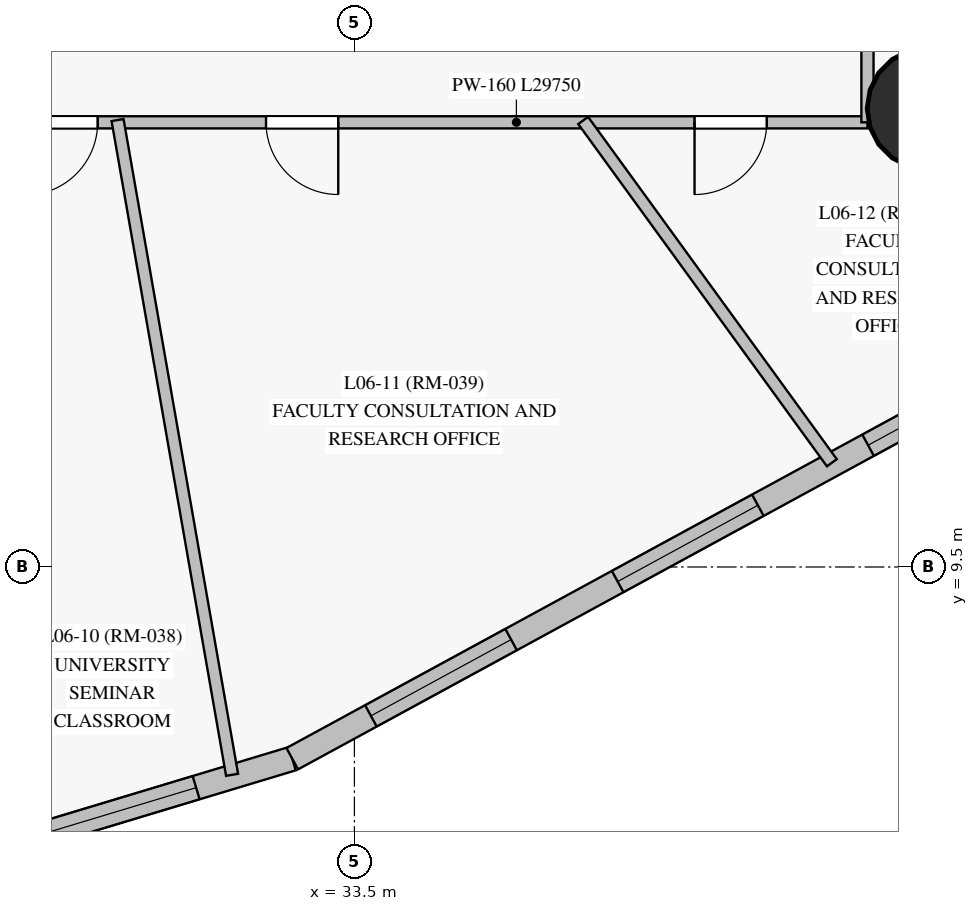
"""IFC4 building model, lengths in metres.
Left out: names, types, materials, properties, quantities, classifications, styles, units other than length and angle.
Written with IfcOpenShell. Run it as: python <this file> out.ifc"""

import sys

from ifc_helpers import new_model, si_unit, direction, frame, frame_2d, origin, origin_with_axes, origin_2d, place, context, subcontext, project, spatial, rectangle, circle, extrude, source, transform, mapped, element, fill, save


model = new_model("IFC4")
c1 = context("Model", 3, precision=1e-05, world=origin(), true_north=direction((0.0, 1.0)))
c2 = subcontext(c1, "Body", "Model", "MODEL_VIEW")
j1 = project(units=[si_unit("LENGTHUNIT", "METRE"), si_unit("PLANEANGLEUNIT", "RADIAN")], contexts=[c1])
p1 = place(None, origin())
s1 = spatial("IfcSite", under=j1, at=p1, CompositionType="ELEMENT")
p2 = place(p1, origin())
s2 = spatial("IfcBuilding", under=s1, at=p2, CompositionType="ELEMENT")
p3 = place(p2, frame((0.0, 0.0, 26.5)))
s3 = spatial("IfcBuildingStorey", under=s2, at=p3, CompositionType="ELEMENT", Elevation=26.5)
m1 = source(origin_with_axes(), c2, "Body", "SweptSolid", [
    extrude(circle(Radius=0.8, at=origin_2d()), origin(), (0.0, 0.0, 1.0), 3.6),
])
p4 = place(p3, frame((41.046, 15.53, 0.0), z_axis=(0.0, 0.0, 1.0), x_axis=(1.0, 0.0, 0.0)))
e1 = element("IfcColumn", 1, at=p4, inside=s3, PredefinedType="COLUMN", context=c2, shape_type="MappedRepresentation", body=[
    mapped(m1, transform((0.0, 0.0, 0.0), scale=1.0)),
])
p5 = place(p3, frame((17.099, 2.279, 0.0), z_axis=(0.0, 0.0, 1.0), x_axis=(0.957423656835, 0.288686579759, 0.0)))
e2 = element("IfcWall", 2, at=p5, inside=s3, PredefinedType="SOLIDWALL", context=c2, shape_type="SweptSolid", body=[
    extrude(rectangle(XDim=16.276, YDim=0.32, at=frame_2d((8.138, 0.0))), origin(), (0.0, 0.0, 1.0), 3.35),
])
p6 = place(p5, frame((1.017, 0.0, 0.85)))
e3 = element("IfcOpeningElement", 3, at=p6, cuts=e2, PredefinedType="OPENING", context=c2, shape_type="SweptSolid", body=[
    extrude(rectangle(XDim=2.1, YDim=1.95, at=frame_2d((1.05, 0.975))), frame((0.0, 0.17, 0.0), z_axis=(0.0, -1.0, 0.0), x_axis=(1.0, 0.0, 0.0)), (0.0, 0.0, 1.0), 0.34),
])
p7 = place(p5, frame((5.208, 0.0, 0.85)))
e4 = element("IfcOpeningElement", 4, at=p7, cuts=e2, PredefinedType="OPENING", context=c2, shape_type="SweptSolid", body=[
    extrude(rectangle(XDim=2.1, YDim=1.95, at=frame_2d((1.05, 0.975))), frame((0.0, 0.17, 0.0), z_axis=(0.0, -1.0, 0.0), x_axis=(1.0, 0.0, 0.0)), (0.0, 0.0, 1.0), 0.34),
])
p8 = place(p5, frame((9.345, 0.0, 0.85)))
e5 = element("IfcOpeningElement", 5, at=p8, cuts=e2, PredefinedType="OPENING", context=c2, shape_type="SweptSolid", body=[
    extrude(rectangle(XDim=2.1, YDim=1.95, at=frame_2d((1.05, 0.975))), frame((0.0, 0.17, 0.0), z_axis=(0.0, -1.0, 0.0), x_axis=(1.0, 0.0, 0.0)), (0.0, 0.0, 1.0), 0.34),
])
p9 = place(p5, frame((12.855, 0.0, 0.85)))
e6 = element("IfcOpeningElement", 6, at=p9, cuts=e2, PredefinedType="OPENING", context=c2, shape_type="SweptSolid", body=[
    extrude(rectangle(XDim=2.1, YDim=1.95, at=frame_2d((1.05, 0.975))), frame((0.0, 0.17, 0.0), z_axis=(0.0, -1.0, 0.0), x_axis=(1.0, 0.0, 0.0)), (0.0, 0.0, 1.0), 0.34),
])
p10 = place(p3, frame((32.683, 6.978, 0.0), z_axis=(0.0, 0.0, 1.0), x_axis=(0.878311519502, 0.478088772833, 0.0)))
e7 = element("IfcWall", 7, at=p10, inside=s3, PredefinedType="SOLIDWALL", context=c2, shape_type="SweptSolid", body=[
    extrude(rectangle(XDim=11.319, YDim=0.32, at=frame_2d((5.659, 0.0))), origin(), (0.0, 0.0, 1.0), 3.35),
])
p11 = place(p10, frame((1.178, 0.0, 0.85)))
e8 = element("IfcOpeningElement", 8, at=p11, cuts=e7, PredefinedType="OPENING", context=c2, shape_type="SweptSolid", body=[
    extrude(rectangle(XDim=2.1, YDim=1.95, at=frame_2d((1.05, 0.975))), frame((0.0, 0.17, 0.0), z_axis=(0.0, -1.0, 0.0), x_axis=(1.0, 0.0, 0.0)), (0.0, 0.0, 1.0), 0.34),
])
p12 = place(p10, frame((4.874, 0.0, 0.85)))
e9 = element("IfcOpeningElement", 9, at=p12, cuts=e7, PredefinedType="OPENING", context=c2, shape_type="SweptSolid", body=[
    extrude(rectangle(XDim=2.1, YDim=1.95, at=frame_2d((1.05, 0.975))), frame((0.0, 0.17, 0.0), z_axis=(0.0, -1.0, 0.0), x_axis=(1.0, 0.0, 0.0)), (0.0, 0.0, 1.0), 0.34),
])
p13 = place(p10, frame((8.625, 0.0, 0.85)))
e10 = element("IfcOpeningElement", 10, at=p13, cuts=e7, PredefinedType="OPENING", context=c2, shape_type="SweptSolid", body=[
    extrude(rectangle(XDim=2.1, YDim=1.95, at=frame_2d((1.05, 0.975))), frame((0.0, 0.17, 0.0), z_axis=(0.0, -1.0, 0.0), x_axis=(1.0, 0.0, 0.0)), (0.0, 0.0, 1.0), 0.34),
])
p14 = place(p3, frame((40.25, 15.35, 0.0), z_axis=(0.0, 0.0, 1.0), x_axis=(-1.0, 0.0, 0.0)))
e11 = element("IfcWall", 11, at=p14, inside=s3, PredefinedType="PARTITIONING", context=c2, shape_type="SweptSolid", body=[
    extrude(rectangle(XDim=29.75, YDim=0.16, at=frame_2d((14.875, 0.0))), origin(), (0.0, 0.0, 1.0), 2.7),
])
p15 = place(p14, frame((26.803, 0.0, 0.0)))
e12 = element("IfcOpeningElement", 12, at=p15, cuts=e11, PredefinedType="OPENING", context=c2, shape_type="SweptSolid", body=[
    extrude(rectangle(XDim=0.95, YDim=2.15, at=frame_2d((0.475, 1.075))), frame((0.0, 0.09, 0.0), z_axis=(0.0, -1.0, 0.0), x_axis=(1.0, 0.0, 0.0)), (0.0, 0.0, 1.0), 0.18),
])
p16 = place(p14, frame((23.181, 0.0, 0.0)))
e13 = element("IfcOpeningElement", 13, at=p16, cuts=e11, PredefinedType="OPENING", context=c2, shape_type="SweptSolid", body=[
    extrude(rectangle(XDim=0.95, YDim=2.15, at=frame_2d((0.475, 1.075))), frame((0.0, 0.09, 0.0), z_axis=(0.0, -1.0, 0.0), x_axis=(1.0, 0.0, 0.0)), (0.0, 0.0, 1.0), 0.18),
])
p17 = place(p14, frame((21.097, 0.0, 0.0)))
e14 = element("IfcOpeningElement", 14, at=p17, cuts=e11, PredefinedType="OPENING", context=c2, shape_type="SweptSolid", body=[
    extrude(rectangle(XDim=0.95, YDim=2.15, at=frame_2d((0.475, 1.075))), frame((0.0, 0.09, 0.0), z_axis=(0.0, -1.0, 0.0), x_axis=(1.0, 0.0, 0.0)), (0.0, 0.0, 1.0), 0.18),
])
p18 = place(p14, frame((18.772, 0.0, 0.0)))
e15 = element("IfcOpeningElement", 15, at=p18, cuts=e11, PredefinedType="OPENING", context=c2, shape_type="SweptSolid", body=[
    extrude(rectangle(XDim=0.95, YDim=2.15, at=frame_2d((0.475, 1.075))), frame((0.0, 0.09, 0.0), z_axis=(0.0, -1.0, 0.0), x_axis=(1.0, 0.0, 0.0)), (0.0, 0.0, 1.0), 0.18),
])
p19 = place(p14, frame((16.089, 0.0, 0.0)))
e16 = element("IfcOpeningElement", 16, at=p19, cuts=e11, PredefinedType="OPENING", context=c2, shape_type="SweptSolid", body=[
    extrude(rectangle(XDim=0.96, YDim=2.15, at=frame_2d((0.48, 1.075))), frame((0.0, 0.09, 0.0), z_axis=(0.0, -1.0, 0.0), x_axis=(1.0, 0.0, 0.0)), (0.0, 0.0, 1.0), 0.18),
])
p20 = place(p14, frame((14.21, 0.0, 0.0)))
e17 = element("IfcOpeningElement", 17, at=p20, cuts=e11, PredefinedType="OPENING", context=c2, shape_type="SweptSolid", body=[
    extrude(rectangle(XDim=0.95, YDim=2.15, at=frame_2d((0.475, 1.075))), frame((0.0, 0.09, 0.0), z_axis=(0.0, -1.0, 0.0), x_axis=(1.0, 0.0, 0.0)), (0.0, 0.0, 1.0), 0.18),
])
p21 = place(p14, frame((11.995, 0.0, 0.0)))
e18 = element("IfcOpeningElement", 18, at=p21, cuts=e11, PredefinedType="OPENING", context=c2, shape_type="SweptSolid", body=[
    extrude(rectangle(XDim=0.95, YDim=2.15, at=frame_2d((0.475, 1.075))), frame((0.0, 0.09, 0.0), z_axis=(0.0, -1.0, 0.0), x_axis=(1.0, 0.0, 0.0)), (0.0, 0.0, 1.0), 0.18),
])
p22 = place(p14, frame((10.127, 0.0, 0.0)))
e19 = element("IfcOpeningElement", 19, at=p22, cuts=e11, PredefinedType="OPENING", context=c2, shape_type="SweptSolid", body=[
    extrude(rectangle(XDim=0.96, YDim=2.15, at=frame_2d((0.48, 1.075))), frame((0.0, 0.09, 0.0), z_axis=(0.0, -1.0, 0.0), x_axis=(1.0, 0.0, 0.0)), (0.0, 0.0, 1.0), 0.18),
])
p23 = place(p14, frame((6.962, 0.0, 0.0)))
e20 = element("IfcOpeningElement", 20, at=p23, cuts=e11, PredefinedType="OPENING", context=c2, shape_type="SweptSolid", body=[
    extrude(rectangle(XDim=0.95, YDim=2.15, at=frame_2d((0.475, 1.075))), frame((0.0, 0.09, 0.0), z_axis=(0.0, -1.0, 0.0), x_axis=(1.0, 0.0, 0.0)), (0.0, 0.0, 1.0), 0.18),
])
p24 = place(p14, frame((1.325, 0.0, 0.0)))
e21 = element("IfcOpeningElement", 21, at=p24, cuts=e11, PredefinedType="OPENING", context=c2, shape_type="SweptSolid", body=[
    extrude(rectangle(XDim=0.95, YDim=2.15, at=frame_2d((0.475, 1.075))), frame((0.0, 0.09, 0.0), z_axis=(0.0, -1.0, 0.0), x_axis=(1.0, 0.0, 0.0)), (0.0, 0.0, 1.0), 0.18),
])
p25 = place(p3, frame((40.25, 37.65, 0.0), z_axis=(0.0, 0.0, 1.0), x_axis=(0.0, -1.0, 0.0)))
e22 = element("IfcWall", 22, at=p25, inside=s3, PredefinedType="PARTITIONING", context=c2, shape_type="SweptSolid", body=[
    extrude(rectangle(XDim=22.3, YDim=0.16, at=frame_2d((11.15, 0.0))), origin(), (0.0, 0.0, 1.0), 2.75),
])
p26 = place(p25, frame((16.25, 0.0, 0.0)))
e23 = element("IfcOpeningElement", 23, at=p26, cuts=e22, PredefinedType="OPENING", context=c2, shape_type="SweptSolid", body=[
    extrude(rectangle(XDim=0.96, YDim=2.15, at=frame_2d((0.48, 1.075))), frame((0.0, 0.09, 0.0), z_axis=(0.0, -1.0, 0.0), x_axis=(1.0, 0.0, 0.0)), (0.0, 0.0, 1.0), 0.18),
])
p27 = place(p25, frame((14.02, 0.0, 0.0)))
e24 = element("IfcOpeningElement", 24, at=p27, cuts=e22, PredefinedType="OPENING", context=c2, shape_type="SweptSolid", body=[
    extrude(rectangle(XDim=0.95, YDim=2.15, at=frame_2d((0.475, 1.075))), frame((0.0, 0.09, 0.0), z_axis=(0.0, -1.0, 0.0), x_axis=(1.0, 0.0, 0.0)), (0.0, 0.0, 1.0), 0.18),
])
p28 = place(p25, frame((12.052, 0.0, 0.0)))
e25 = element("IfcOpeningElement", 25, at=p28, cuts=e22, PredefinedType="OPENING", context=c2, shape_type="SweptSolid", body=[
    extrude(rectangle(XDim=0.95, YDim=2.15, at=frame_2d((0.475, 1.075))), frame((0.0, 0.09, 0.0), z_axis=(0.0, -1.0, 0.0), x_axis=(1.0, 0.0, 0.0)), (0.0, 0.0, 1.0), 0.18),
])
p29 = place(p25, frame((4.235, 0.0, 0.0)))
e26 = element("IfcOpeningElement", 26, at=p29, cuts=e22, PredefinedType="OPENING", context=c2, shape_type="SweptSolid", body=[
    extrude(rectangle(XDim=0.96, YDim=2.15, at=frame_2d((0.48, 1.075))), frame((0.0, 0.09, 0.0), z_axis=(0.0, -1.0, 0.0), x_axis=(1.0, 0.0, 0.0)), (0.0, 0.0, 1.0), 0.18),
])
p30 = place(p25, frame((10.45, 0.0, 0.0)))
e27 = element("IfcOpeningElement", 27, at=p30, cuts=e22, PredefinedType="OPENING", context=c2, shape_type="SweptSolid", body=[
    extrude(rectangle(XDim=0.86, YDim=2.1, at=frame_2d((0.43, 1.05))), frame((0.0, 0.09, 0.0), z_axis=(0.0, -1.0, 0.0), x_axis=(1.0, 0.0, 0.0)), (0.0, 0.0, 1.0), 0.18),
])
p31 = place(p25, frame((1.94, 0.0, 0.0)))
e28 = element("IfcOpeningElement", 28, at=p31, cuts=e22, PredefinedType="OPENING", context=c2, shape_type="SweptSolid", body=[
    extrude(rectangle(XDim=0.96, YDim=2.15, at=frame_2d((0.48, 1.075))), frame((0.0, 0.09, 0.0), z_axis=(0.0, -1.0, 0.0), x_axis=(1.0, 0.0, 0.0)), (0.0, 0.0, 1.0), 0.18),
])
p32 = place(p25, frame((17.39, 0.0, 0.0)))
e29 = element("IfcOpeningElement", 29, at=p32, cuts=e22, PredefinedType="OPENING", context=c2, shape_type="SweptSolid", body=[
    extrude(rectangle(XDim=0.95, YDim=2.15, at=frame_2d((0.475, 1.075))), frame((0.0, 0.09, 0.0), z_axis=(0.0, -1.0, 0.0), x_axis=(1.0, 0.0, 0.0)), (0.0, 0.0, 1.0), 0.18),
])
p33 = place(p25, frame((18.522, 0.0, 0.0)))
e30 = element("IfcOpeningElement", 30, at=p33, cuts=e22, PredefinedType="OPENING", context=c2, shape_type="SweptSolid", body=[
    extrude(rectangle(XDim=0.95, YDim=2.15, at=frame_2d((0.475, 1.075))), frame((0.0, 0.09, 0.0), z_axis=(0.0, -1.0, 0.0), x_axis=(1.0, 0.0, 0.0)), (0.0, 0.0, 1.0), 0.18),
])
p34 = place(p25, frame((8.331, 0.0, 0.0)))
e31 = element("IfcOpeningElement", 31, at=p34, cuts=e22, PredefinedType="OPENING", context=c2, shape_type="SweptSolid", body=[
    extrude(rectangle(XDim=0.86, YDim=2.04, at=frame_2d((0.43, 1.02))), frame((0.0, 0.09, 0.0), z_axis=(0.0, -1.0, 0.0), x_axis=(1.0, 0.0, 0.0)), (0.0, 0.0, 1.0), 0.18),
])
p35 = place(p25, frame((6.992, 0.0, 0.0)))
e32 = element("IfcOpeningElement", 32, at=p35, cuts=e22, PredefinedType="OPENING", context=c2, shape_type="SweptSolid", body=[
    extrude(rectangle(XDim=0.86, YDim=2.04, at=frame_2d((0.43, 1.02))), frame((0.0, 0.09, 0.0), z_axis=(0.0, -1.0, 0.0), x_axis=(1.0, 0.0, 0.0)), (0.0, 0.0, 1.0), 0.18),
])
p36 = place(p3, frame((30.384, 15.38, 0.0), z_axis=(0.0, 0.0, 1.0), x_axis=(0.172289580818, -0.985046344261, 0.0)))
e33 = element("IfcWall", 33, at=p36, inside=s3, PredefinedType="PARTITIONING", context=c2, shape_type="SweptSolid", body=[
    extrude(rectangle(XDim=8.745, YDim=0.16, at=frame_2d((4.372, 0.0))), origin(), (0.0, 0.0, 1.0), 3.35),
])
p37 = place(p3, frame((40.226, 17.746, 0.0), z_axis=(0.0, 0.0, 1.0), x_axis=(0.803788391649, -0.594915306116, 0.0)))
e34 = element("IfcWall", 34, at=p37, inside=s3, PredefinedType="PARTITIONING", context=c2, shape_type="SweptSolid", body=[
    extrude(rectangle(XDim=5.76, YDim=0.16, at=frame_2d((2.88, 0.0))), origin(), (0.0, 0.0, 1.0), 3.35),
])
p38 = place(p3, frame((36.51, 15.374, 0.0), z_axis=(0.0, 0.0, 1.0), x_axis=(0.587832607998, -0.808982586324, 0.0)))
e35 = element("IfcWall", 35, at=p38, inside=s3, PredefinedType="PARTITIONING", context=c2, shape_type="SweptSolid", body=[
    extrude(rectangle(XDim=5.566, YDim=0.16, at=frame_2d((2.783, 0.0))), origin(), (0.0, 0.0, 1.0), 3.35),
])
m2 = source(origin_with_axes(), c2, "Body", "SweptSolid", [
    extrude(rectangle(XDim=2.1, YDim=1.95, at=frame_2d((1.05, 0.975))), frame((0.0, 0.03, 0.0), z_axis=(0.0, -1.0, 0.0), x_axis=(1.0, 0.0, 0.0)), (0.0, 0.0, 1.0), 0.06),
])
p39 = place(p9, origin())
e36 = element("IfcWindow", 36, at=p39, inside=s3, PartitioningType="SINGLE_PANEL", PredefinedType="WINDOW", context=c2, shape_type="MappedRepresentation", body=[
    mapped(m2, transform((0.0, 0.0, 0.0), scale=1.0)),
])
fill(e6, e36)
p40 = place(p11, origin())
e37 = element("IfcWindow", 37, at=p40, inside=s3, PartitioningType="SINGLE_PANEL", PredefinedType="WINDOW", context=c2, shape_type="MappedRepresentation", body=[
    mapped(m2, transform((0.0, 0.0, 0.0), scale=1.0)),
])
fill(e8, e37)
p41 = place(p12, origin())
e38 = element("IfcWindow", 38, at=p41, inside=s3, PartitioningType="SINGLE_PANEL", PredefinedType="WINDOW", context=c2, shape_type="MappedRepresentation", body=[
    mapped(m2, transform((0.0, 0.0, 0.0), scale=1.0)),
])
fill(e9, e38)
p42 = place(p13, origin())
e39 = element("IfcWindow", 39, at=p42, inside=s3, PartitioningType="SINGLE_PANEL", PredefinedType="WINDOW", context=c2, shape_type="MappedRepresentation", body=[
    mapped(m2, transform((0.0, 0.0, 0.0), scale=1.0)),
])
fill(e10, e39)
m3 = source(origin_with_axes(), c2, "Body", "SweptSolid", [
    extrude(rectangle(XDim=0.96, YDim=2.15, at=frame_2d((0.48, 1.075))), frame((0.0, 0.025, 0.0), z_axis=(0.0, -1.0, 0.0), x_axis=(1.0, 0.0, 0.0)), (0.0, 0.0, 1.0), 0.05),
])
p43 = place(p22, origin())
e40 = element("IfcDoor", 40, at=p43, inside=s3, OperationType="SINGLE_SWING_RIGHT", PredefinedType="DOOR", context=c2, shape_type="MappedRepresentation", body=[
    mapped(m3, transform((0.0, 0.0, 0.0), scale=1.0)),
])
fill(e19, e40)
m4 = source(origin_with_axes(), c2, "Body", "SweptSolid", [
    extrude(rectangle(XDim=0.95, YDim=2.15, at=frame_2d((0.475, 1.075))), frame((0.0, 0.025, 0.0), z_axis=(0.0, -1.0, 0.0), x_axis=(1.0, 0.0, 0.0)), (0.0, 0.0, 1.0), 0.05),
])
p44 = place(p23, origin())
e41 = element("IfcDoor", 41, at=p44, inside=s3, OperationType="SINGLE_SWING_LEFT", PredefinedType="DOOR", context=c2, shape_type="MappedRepresentation", body=[
    mapped(m4, transform((0.0, 0.0, 0.0), scale=1.0)),
])
fill(e20, e41)
p45 = place(p24, origin())
e42 = element("IfcDoor", 42, at=p45, inside=s3, OperationType="SINGLE_SWING_RIGHT", PredefinedType="DOOR", context=c2, shape_type="MappedRepresentation", body=[
    mapped(m4, transform((0.0, 0.0, 0.0), scale=1.0)),
])
fill(e21, e42)
save(model, sys.argv[1])
